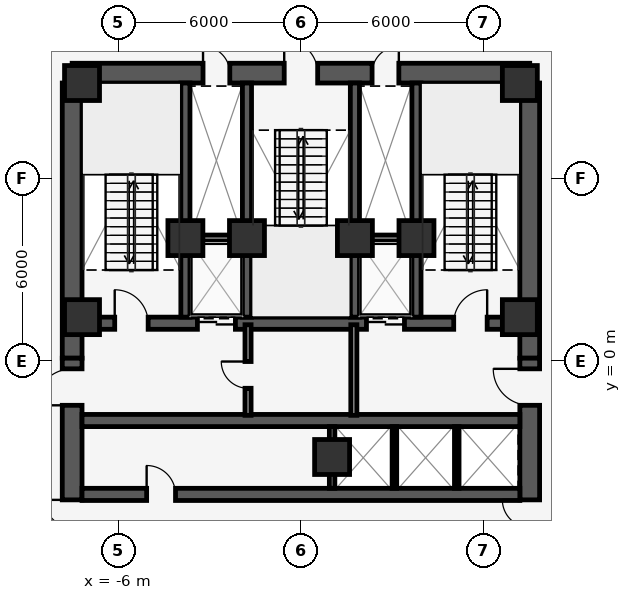
"""IFC4 building model, lengths in metres.
Left out: names, types, materials, properties, quantities, classifications, styles, units other than length and angle.
Written with IfcOpenShell. Run it as: python <this file> out.ifc"""

import sys

from ifc_helpers import new_model, si_unit, direction, frame, frame_2d, origin, origin_2d, place, context, subcontext, project, spatial, rectangle, extrude, element, fill, save


model = new_model("IFC4")
c1 = context("Model", 3, precision=1e-05, world=origin(), true_north=direction((0.0, 1.0)))
c2 = subcontext(c1, "Body", "Model", "MODEL_VIEW")
j1 = project(units=[si_unit("LENGTHUNIT", "METRE"), si_unit("PLANEANGLEUNIT", "RADIAN")], contexts=[c1])
p1 = place(None, origin())
s1 = spatial("IfcSite", under=j1, at=p1, CompositionType="ELEMENT")
p2 = place(p1, origin())
s2 = spatial("IfcBuilding", under=s1, at=p2, CompositionType="ELEMENT")
p3 = place(p2, frame((0.0, 0.0, 218.8)))
s3 = spatial("IfcBuildingStorey", under=s2, at=p3, CompositionType="ELEMENT", Elevation=218.8)
p4 = place(p3, frame((-7.525, 9.475, 0.0), z_axis=(0.0, 0.0, 1.0), x_axis=(1.0, 0.0, 0.0)))
e1 = element("IfcWall", 1, at=p4, inside=s3, PredefinedType="SHEAR", context=c2, shape_type="SweptSolid", body=[
    extrude(rectangle(XDim=15.05, YDim=0.65, at=frame_2d((7.525, 0.0))), origin(), (0.0, 0.0, 1.0), 3.85),
])
p5 = place(p4, frame((6.975, 0.0, 0.0)))
e2 = element("IfcOpeningElement", 2, at=p5, cuts=e1, PredefinedType="OPENING", context=c2, shape_type="SweptSolid", body=[
    extrude(rectangle(XDim=1.1, YDim=2.15, at=frame_2d((0.55, 1.075))), frame((0.0, 0.335, 0.0), z_axis=(0.0, -1.0, 0.0), x_axis=(1.0, 0.0, 0.0)), (0.0, 0.0, 1.0), 0.67),
])
p6 = place(p4, frame((4.305, 0.0, 0.0)))
e3 = element("IfcOpeningElement", 3, at=p6, cuts=e1, PredefinedType="OPENING", context=c2, shape_type="SweptSolid", body=[
    extrude(rectangle(XDim=0.88, YDim=2.15, at=frame_2d((0.44, 1.075))), frame((0.0, 0.335, 0.0), z_axis=(0.0, -1.0, 0.0), x_axis=(1.0, 0.0, 0.0)), (0.0, 0.0, 1.0), 0.67),
])
p7 = place(p4, frame((9.865, 0.0, 0.0)))
e4 = element("IfcOpeningElement", 4, at=p7, cuts=e1, PredefinedType="OPENING", context=c2, shape_type="SweptSolid", body=[
    extrude(rectangle(XDim=0.88, YDim=2.15, at=frame_2d((0.44, 1.075))), frame((0.0, 0.335, 0.0), z_axis=(0.0, -1.0, 0.0), x_axis=(1.0, 0.0, 0.0)), (0.0, 0.0, 1.0), 0.67),
])
p8 = place(p3, frame((-7.2, 1.25, 0.0), z_axis=(0.0, 0.0, 1.0), x_axis=(1.0, 0.0, 0.0)))
e5 = element("IfcWall", 5, at=p8, inside=s3, PredefinedType="SHEAR", context=c2, shape_type="SweptSolid", body=[
    extrude(rectangle(XDim=14.4, YDim=0.4, at=frame_2d((7.2, 0.0))), origin(), (0.0, 0.0, 1.0), 3.85),
])
p9 = place(p8, frame((3.795, 0.0, 0.0)))
e6 = element("IfcOpeningElement", 6, at=p9, cuts=e5, PredefinedType="OPENING", context=c2, shape_type="SweptSolid", body=[
    extrude(rectangle(XDim=1.25, YDim=2.25, at=frame_2d((0.625, 1.125))), frame((0.0, 0.21, 0.0), z_axis=(0.0, -1.0, 0.0), x_axis=(1.0, 0.0, 0.0)), (0.0, 0.0, 1.0), 0.42),
])
p10 = place(p8, frame((9.355, 0.0, 0.0)))
e7 = element("IfcOpeningElement", 7, at=p10, cuts=e5, PredefinedType="OPENING", context=c2, shape_type="SweptSolid", body=[
    extrude(rectangle(XDim=1.25, YDim=2.25, at=frame_2d((0.625, 1.125))), frame((0.0, 0.21, 0.0), z_axis=(0.0, -1.0, 0.0), x_axis=(1.0, 0.0, 0.0)), (0.0, 0.0, 1.0), 0.42),
])
p11 = place(p8, frame((1.075, 0.0, 0.0)))
e8 = element("IfcOpeningElement", 8, at=p11, cuts=e5, PredefinedType="OPENING", context=c2, shape_type="SweptSolid", body=[
    extrude(rectangle(XDim=1.1, YDim=2.15, at=frame_2d((0.55, 1.075))), frame((0.0, 0.21, 0.0), z_axis=(0.0, -1.0, 0.0), x_axis=(1.0, 0.0, 0.0)), (0.0, 0.0, 1.0), 0.42),
])
p12 = place(p8, frame((12.225, 0.0, 0.0)))
e9 = element("IfcOpeningElement", 9, at=p12, cuts=e5, PredefinedType="OPENING", context=c2, shape_type="SweptSolid", body=[
    extrude(rectangle(XDim=1.1, YDim=2.15, at=frame_2d((0.55, 1.075))), frame((0.0, 0.21, 0.0), z_axis=(0.0, -1.0, 0.0), x_axis=(1.0, 0.0, 0.0)), (0.0, 0.0, 1.0), 0.42),
])
for number, where, z_axis, x_axis in (
    (10, (-3.8, 1.45, 0.0), (0.0, 0.0, 1.0), (0.0, 1.0, 0.0)),
    (11, (-1.775, 1.45, 0.0), (0.0, 0.0, 1.0), (0.0, 1.0, 0.0)),
    (12, (1.775, 1.45, 0.0), (0.0, 0.0, 1.0), (0.0, 1.0, 0.0)),
    (13, (3.8, 1.45, 0.0), (0.0, 0.0, 1.0), (0.0, 1.0, 0.0)),
):
    element("IfcWall", number, at=place(p3, frame(where, z_axis=z_axis, x_axis=x_axis)), inside=s3, PredefinedType="SHEAR", context=c2, shape_type="SweptSolid", body=[
        extrude(rectangle(XDim=7.7, YDim=0.3, at=frame_2d((3.85, 0.0))), origin(), (0.0, 0.0, 1.0), 3.85),
    ])
for number, where, z_axis, x_axis in (
    (14, (-7.525, 0.1, 0.0), (0.0, 0.0, 1.0), (0.0, 1.0, 0.0)),
    (15, (7.525, 0.1, 0.0), (0.0, 0.0, 1.0), (0.0, 1.0, 0.0)),
):
    element("IfcWall", number, at=place(p3, frame(where, z_axis=z_axis, x_axis=x_axis)), inside=s3, PredefinedType="SHEAR", context=c2, shape_type="SweptSolid", body=[
        extrude(rectangle(XDim=9.05, YDim=0.65, at=frame_2d((4.525, 0.0))), origin(), (0.0, 0.0, 1.0), 3.85),
    ])
p13 = place(p3, frame((-7.525, -8.925, 0.0), z_axis=(0.0, 0.0, 1.0), x_axis=(0.0, 1.0, 0.0)))
e16 = element("IfcWall", 16, at=p13, inside=s3, PredefinedType="SHEAR", context=c2, shape_type="SweptSolid", body=[
    extrude(rectangle(XDim=9.025, YDim=0.65, at=frame_2d((4.513, 0.0))), origin(), (0.0, 0.0, 1.0), 3.85),
])
p14 = place(p13, frame((2.565, 0.0, 0.0)))
e17 = element("IfcOpeningElement", 17, at=p14, cuts=e16, PredefinedType="OPENING", context=c2, shape_type="SweptSolid", body=[
    extrude(rectangle(XDim=1.8, YDim=2.2, at=frame_2d((0.9, 1.1))), frame((0.0, 0.335, 0.0), z_axis=(0.0, -1.0, 0.0), x_axis=(1.0, 0.0, 0.0)), (0.0, 0.0, 1.0), 0.67),
])
p15 = place(p13, frame((7.475, 0.0, 0.0)))
e18 = element("IfcOpeningElement", 18, at=p15, cuts=e16, PredefinedType="OPENING", context=c2, shape_type="SweptSolid", body=[
    extrude(rectangle(XDim=1.2, YDim=2.15, at=frame_2d((0.6, 1.075))), frame((0.0, 0.335, 0.0), z_axis=(0.0, -1.0, 0.0), x_axis=(1.0, 0.0, 0.0)), (0.0, 0.0, 1.0), 0.67),
])
p16 = place(p3, frame((7.525, -8.925, 0.0), z_axis=(0.0, 0.0, 1.0), x_axis=(0.0, 1.0, 0.0)))
e19 = element("IfcWall", 19, at=p16, inside=s3, PredefinedType="SHEAR", context=c2, shape_type="SweptSolid", body=[
    extrude(rectangle(XDim=9.025, YDim=0.65, at=frame_2d((4.513, 0.0))), origin(), (0.0, 0.0, 1.0), 3.85),
])
p17 = place(p16, frame((2.565, 0.0, 0.0)))
e20 = element("IfcOpeningElement", 20, at=p17, cuts=e19, PredefinedType="OPENING", context=c2, shape_type="SweptSolid", body=[
    extrude(rectangle(XDim=1.8, YDim=2.2, at=frame_2d((0.9, 1.1))), frame((0.0, 0.335, 0.0), z_axis=(0.0, -1.0, 0.0), x_axis=(1.0, 0.0, 0.0)), (0.0, 0.0, 1.0), 0.67),
])
p18 = place(p16, frame((7.475, 0.0, 0.0)))
e21 = element("IfcOpeningElement", 21, at=p18, cuts=e19, PredefinedType="OPENING", context=c2, shape_type="SweptSolid", body=[
    extrude(rectangle(XDim=1.2, YDim=2.15, at=frame_2d((0.6, 1.075))), frame((0.0, 0.335, 0.0), z_axis=(0.0, -1.0, 0.0), x_axis=(1.0, 0.0, 0.0)), (0.0, 0.0, 1.0), 0.67),
])
p19 = place(p3, frame((-7.2, -1.95, 0.0), z_axis=(0.0, 0.0, 1.0), x_axis=(1.0, 0.0, 0.0)))
e22 = element("IfcWall", 22, at=p19, inside=s3, PredefinedType="SHEAR", context=c2, shape_type="SweptSolid", body=[
    extrude(rectangle(XDim=14.4, YDim=0.4, at=frame_2d((7.2, 0.0))), origin(), (0.0, 0.0, 1.0), 3.85),
])
p20 = place(p3, frame((-7.2, -4.38, 0.0), z_axis=(0.0, 0.0, 1.0), x_axis=(1.0, 0.0, 0.0)))
e23 = element("IfcWall", 23, at=p20, inside=s3, PredefinedType="SHEAR", context=c2, shape_type="SweptSolid", body=[
    extrude(rectangle(XDim=14.4, YDim=0.4, at=frame_2d((7.2, 0.0))), origin(), (0.0, 0.0, 1.0), 3.85),
])
p21 = place(p20, frame((2.125, 0.0, 0.0)))
e24 = element("IfcOpeningElement", 24, at=p21, cuts=e23, PredefinedType="OPENING", context=c2, shape_type="SweptSolid", body=[
    extrude(rectangle(XDim=0.95, YDim=2.15, at=frame_2d((0.475, 1.075))), frame((0.0, 0.21, 0.0), z_axis=(0.0, -1.0, 0.0), x_axis=(1.0, 0.0, 0.0)), (0.0, 0.0, 1.0), 0.42),
])
for number, where, z_axis, x_axis in (
    (25, (7.2, 1.45, 0.0), (0.0, 0.0, 1.0), (1.0, 0.0, 0.0)),
    (26, (7.2, 9.15, 0.0), (0.0, 0.0, 1.0), (1.0, 0.0, 0.0)),
    (27, (-7.2, 9.15, 0.0), (0.0, 0.0, 1.0), (1.0, 0.0, 0.0)),
    (28, (-7.2, 1.45, 0.0), (0.0, 0.0, 1.0), (1.0, 0.0, 0.0)),
    (29, (-3.8, 4.05, 0.0), (0.0, 0.0, 1.0), (1.0, 0.0, 0.0)),
    (30, (3.8, 4.05, 0.0), (0.0, 0.0, 1.0), (1.0, 0.0, 0.0)),
    (31, (-1.775, 4.05, 0.0), (0.0, 0.0, 1.0), (1.0, 0.0, 0.0)),
    (32, (1.775, 4.05, 0.0), (0.0, 0.0, 1.0), (1.0, 0.0, 0.0)),
    (33, (1.025, -3.15, 0.0), (0.0, 0.0, 1.0), (1.0, 0.0, 0.0)),
):
    element("IfcColumn", number, at=place(p3, frame(where, z_axis=z_axis, x_axis=x_axis)), inside=s3, PredefinedType="COLUMN", context=c2, shape_type="SweptSolid", body=[
        extrude(rectangle(XDim=1.15, YDim=1.15, at=origin_2d()), origin(), (0.0, 0.0, 1.0), 4.1),
    ])
p22 = place(p3, frame((-15.144, 28.322, 0.0), z_axis=(0.0, 0.0, 1.0), x_axis=(0.908932099953, -0.416944166136, 0.0)))
e34 = element("IfcWall", 34, at=p22, inside=s3, PredefinedType="STANDARD", context=c2, shape_type="SweptSolid", body=[
    extrude(rectangle(XDim=52.128, YDim=0.3, at=frame_2d((26.064, 0.0))), origin(), (0.0, 0.0, 1.0), 3.85),
])
p23 = place(p22, frame((5.864, 0.0, 0.85)))
e35 = element("IfcOpeningElement", 35, at=p23, cuts=e34, PredefinedType="OPENING", context=c2, shape_type="SweptSolid", body=[
    extrude(rectangle(XDim=1.2, YDim=2.2, at=frame_2d((0.6, 1.1))), frame((0.0, 0.16, 0.0), z_axis=(0.0, -1.0, 0.0), x_axis=(1.0, 0.0, 0.0)), (0.0, 0.0, 1.0), 0.32),
])
p24 = place(p22, frame((22.664, 0.0, 0.85)))
e36 = element("IfcOpeningElement", 36, at=p24, cuts=e34, PredefinedType="OPENING", context=c2, shape_type="SweptSolid", body=[
    extrude(rectangle(XDim=1.2, YDim=2.2, at=frame_2d((0.6, 1.1))), frame((0.0, 0.16, 0.0), z_axis=(0.0, -1.0, 0.0), x_axis=(1.0, 0.0, 0.0)), (0.0, 0.0, 1.0), 0.32),
])
p25 = place(p22, frame((28.264, 0.0, 0.85)))
e37 = element("IfcOpeningElement", 37, at=p25, cuts=e34, PredefinedType="OPENING", context=c2, shape_type="SweptSolid", body=[
    extrude(rectangle(XDim=1.2, YDim=2.2, at=frame_2d((0.6, 1.1))), frame((0.0, 0.16, 0.0), z_axis=(0.0, -1.0, 0.0), x_axis=(1.0, 0.0, 0.0)), (0.0, 0.0, 1.0), 0.32),
])
p26 = place(p22, frame((39.464, 0.0, 0.85)))
e38 = element("IfcOpeningElement", 38, at=p26, cuts=e34, PredefinedType="OPENING", context=c2, shape_type="SweptSolid", body=[
    extrude(rectangle(XDim=1.2, YDim=2.2, at=frame_2d((0.6, 1.1))), frame((0.0, 0.16, 0.0), z_axis=(0.0, -1.0, 0.0), x_axis=(1.0, 0.0, 0.0)), (0.0, 0.0, 1.0), 0.32),
])
p27 = place(p22, frame((45.064, 0.0, 0.85)))
e39 = element("IfcOpeningElement", 39, at=p27, cuts=e34, PredefinedType="OPENING", context=c2, shape_type="SweptSolid", body=[
    extrude(rectangle(XDim=1.2, YDim=2.2, at=frame_2d((0.6, 1.1))), frame((0.0, 0.16, 0.0), z_axis=(0.0, -1.0, 0.0), x_axis=(1.0, 0.0, 0.0)), (0.0, 0.0, 1.0), 0.32),
])
p28 = place(p3, frame((32.918, -0.931, 0.0), z_axis=(0.0, 0.0, 1.0), x_axis=(-0.819151415939, -0.573577333727, 0.0)))
e40 = element("IfcWall", 40, at=p28, inside=s3, PredefinedType="STANDARD", context=c2, shape_type="SweptSolid", body=[
    extrude(rectangle(XDim=52.863, YDim=0.3, at=frame_2d((26.431, 0.0))), origin(), (0.0, 0.0, 1.0), 3.85),
])
p29 = place(p28, frame((25.931, 0.0, 0.0)))
e41 = element("IfcOpeningElement", 41, at=p29, cuts=e40, PredefinedType="OPENING", context=c2, shape_type="SweptSolid", body=[
    extrude(rectangle(XDim=1.0, YDim=2.15, at=frame_2d((0.5, 1.075))), frame((0.0, 0.16, 0.0), z_axis=(0.0, -1.0, 0.0), x_axis=(1.0, 0.0, 0.0)), (0.0, 0.0, 1.0), 0.32),
])
p30 = place(p28, frame((6.231, 0.0, 0.85)))
e42 = element("IfcOpeningElement", 42, at=p30, cuts=e40, PredefinedType="OPENING", context=c2, shape_type="SweptSolid", body=[
    extrude(rectangle(XDim=1.2, YDim=2.2, at=frame_2d((0.6, 1.1))), frame((0.0, 0.16, 0.0), z_axis=(0.0, -1.0, 0.0), x_axis=(1.0, 0.0, 0.0)), (0.0, 0.0, 1.0), 0.32),
])
p31 = place(p28, frame((11.831, 0.0, 0.85)))
e43 = element("IfcOpeningElement", 43, at=p31, cuts=e40, PredefinedType="OPENING", context=c2, shape_type="SweptSolid", body=[
    extrude(rectangle(XDim=1.2, YDim=2.2, at=frame_2d((0.6, 1.1))), frame((0.0, 0.16, 0.0), z_axis=(0.0, -1.0, 0.0), x_axis=(1.0, 0.0, 0.0)), (0.0, 0.0, 1.0), 0.32),
])
p32 = place(p28, frame((23.031, 0.0, 0.85)))
e44 = element("IfcOpeningElement", 44, at=p32, cuts=e40, PredefinedType="OPENING", context=c2, shape_type="SweptSolid", body=[
    extrude(rectangle(XDim=1.2, YDim=2.2, at=frame_2d((0.6, 1.1))), frame((0.0, 0.16, 0.0), z_axis=(0.0, -1.0, 0.0), x_axis=(1.0, 0.0, 0.0)), (0.0, 0.0, 1.0), 0.32),
])
p33 = place(p28, frame((28.631, 0.0, 0.85)))
e45 = element("IfcOpeningElement", 45, at=p33, cuts=e40, PredefinedType="OPENING", context=c2, shape_type="SweptSolid", body=[
    extrude(rectangle(XDim=1.2, YDim=2.2, at=frame_2d((0.6, 1.1))), frame((0.0, 0.16, 0.0), z_axis=(0.0, -1.0, 0.0), x_axis=(1.0, 0.0, 0.0)), (0.0, 0.0, 1.0), 0.32),
])
p34 = place(p28, frame((39.831, 0.0, 0.85)))
e46 = element("IfcOpeningElement", 46, at=p34, cuts=e40, PredefinedType="OPENING", context=c2, shape_type="SweptSolid", body=[
    extrude(rectangle(XDim=1.2, YDim=2.2, at=frame_2d((0.6, 1.1))), frame((0.0, 0.16, 0.0), z_axis=(0.0, -1.0, 0.0), x_axis=(1.0, 0.0, 0.0)), (0.0, 0.0, 1.0), 0.32),
])
p35 = place(p28, frame((45.431, 0.0, 0.85)))
e47 = element("IfcOpeningElement", 47, at=p35, cuts=e40, PredefinedType="OPENING", context=c2, shape_type="SweptSolid", body=[
    extrude(rectangle(XDim=1.2, YDim=2.2, at=frame_2d((0.6, 1.1))), frame((0.0, 0.16, 0.0), z_axis=(0.0, -1.0, 0.0), x_axis=(1.0, 0.0, 0.0)), (0.0, 0.0, 1.0), 0.32),
])
for number, where, z_axis, x_axis in (
    (48, (-3.65, 4.05, 0.0), (0.0, 0.0, 1.0), (1.0, 0.0, 0.0)),
    (49, (1.92, 4.05, 0.0), (0.0, 0.0, 1.0), (1.0, 0.0, 0.0)),
):
    element("IfcWall", number, at=place(p3, frame(where, z_axis=z_axis, x_axis=x_axis)), inside=s3, PredefinedType="PARTITIONING", context=c2, shape_type="SweptSolid", body=[
        extrude(rectangle(XDim=1.73, YDim=0.2, at=frame_2d((0.865, 0.0))), origin(), (0.0, 0.0, 1.0), 3.85),
    ])
p36 = place(p3, frame((1.025, -4.18, 0.0), z_axis=(0.0, 0.0, 1.0), x_axis=(0.0, 1.0, 0.0)))
e50 = element("IfcWall", 50, at=p36, inside=s3, PredefinedType="PARTITIONING", context=c2, shape_type="SweptSolid", body=[
    extrude(rectangle(XDim=2.03, YDim=0.18, at=frame_2d((1.015, 0.0))), origin(), (0.0, 0.0, 1.0), 2.898),
])
for number, where, z_axis, x_axis in (
    (51, (3.075, -4.18, 0.0), (0.0, 0.0, 1.0), (0.0, 1.0, 0.0)),
    (52, (5.125, -4.18, 0.0), (0.0, 0.0, 1.0), (0.0, 1.0, 0.0)),
):
    element("IfcWall", number, at=place(p3, frame(where, z_axis=z_axis, x_axis=x_axis)), inside=s3, PredefinedType="PARTITIONING", context=c2, shape_type="SweptSolid", body=[
        extrude(rectangle(XDim=2.03, YDim=0.15, at=frame_2d((1.015, 0.0))), origin(), (0.0, 0.0, 1.0), 3.85),
    ])
p37 = place(p3, frame((-1.74, -1.78, 0.0), z_axis=(0.0, 0.0, 1.0), x_axis=(0.0, 1.0, 0.0)))
e53 = element("IfcWall", 53, at=p37, inside=s3, PredefinedType="PARTITIONING", context=c2, shape_type="SweptSolid", body=[
    extrude(rectangle(XDim=2.98, YDim=0.2, at=frame_2d((1.49, 0.0))), origin(), (0.0, 0.0, 1.0), 3.85),
])
p38 = place(p37, frame((0.89, 0.0, 0.0)))
e54 = element("IfcOpeningElement", 54, at=p38, cuts=e53, PredefinedType="OPENING", context=c2, shape_type="SweptSolid", body=[
    extrude(rectangle(XDim=0.88, YDim=2.15, at=frame_2d((0.44, 1.075))), frame((0.0, 0.11, 0.0), z_axis=(0.0, -1.0, 0.0), x_axis=(1.0, 0.0, 0.0)), (0.0, 0.0, 1.0), 0.22),
])
p39 = place(p3, frame((1.74, -1.78, 0.0), z_axis=(0.0, 0.0, 1.0), x_axis=(0.0, 1.0, 0.0)))
e55 = element("IfcWall", 55, at=p39, inside=s3, PredefinedType="PARTITIONING", context=c2, shape_type="SweptSolid", body=[
    extrude(rectangle(XDim=2.98, YDim=0.2, at=frame_2d((1.49, 0.0))), origin(), (0.0, 0.0, 1.0), 3.85),
])
p40 = place(p9, origin())
e56 = element("IfcDoor", 56, at=p40, inside=s3, OperationType="DOUBLE_DOOR_SLIDING", PredefinedType="DOOR", context=c2, shape_type="SweptSolid", body=[
    extrude(rectangle(XDim=1.25, YDim=2.25, at=frame_2d((0.625, 1.125))), frame((0.0, 0.025, 0.0), z_axis=(0.0, -1.0, 0.0), x_axis=(1.0, 0.0, 0.0)), (0.0, 0.0, 1.0), 0.05),
])
fill(e6, e56)
p41 = place(p10, origin())
e57 = element("IfcDoor", 57, at=p41, inside=s3, OperationType="DOUBLE_DOOR_SLIDING", PredefinedType="DOOR", context=c2, shape_type="SweptSolid", body=[
    extrude(rectangle(XDim=1.25, YDim=2.25, at=frame_2d((0.625, 1.125))), frame((0.0, 0.025, 0.0), z_axis=(0.0, -1.0, 0.0), x_axis=(1.0, 0.0, 0.0)), (0.0, 0.0, 1.0), 0.05),
])
fill(e7, e57)
p42 = place(p11, origin())
e58 = element("IfcDoor", 58, at=p42, inside=s3, OperationType="SINGLE_SWING_LEFT", PredefinedType="DOOR", context=c2, shape_type="SweptSolid", body=[
    extrude(rectangle(XDim=1.1, YDim=2.15, at=frame_2d((0.55, 1.075))), frame((0.0, 0.025, 0.0), z_axis=(0.0, -1.0, 0.0), x_axis=(1.0, 0.0, 0.0)), (0.0, 0.0, 1.0), 0.05),
])
fill(e8, e58)
p43 = place(p12, origin())
e59 = element("IfcDoor", 59, at=p43, inside=s3, OperationType="SINGLE_SWING_RIGHT", PredefinedType="DOOR", context=c2, shape_type="SweptSolid", body=[
    extrude(rectangle(XDim=1.1, YDim=2.15, at=frame_2d((0.55, 1.075))), frame((0.0, 0.025, 0.0), z_axis=(0.0, -1.0, 0.0), x_axis=(1.0, 0.0, 0.0)), (0.0, 0.0, 1.0), 0.05),
])
fill(e9, e59)
p44 = place(p5, origin())
e60 = element("IfcDoor", 60, at=p44, inside=s3, OperationType="SINGLE_SWING_LEFT", PredefinedType="DOOR", context=c2, shape_type="SweptSolid", body=[
    extrude(rectangle(XDim=1.1, YDim=2.15, at=frame_2d((0.55, 1.075))), frame((0.0, 0.025, 0.0), z_axis=(0.0, -1.0, 0.0), x_axis=(1.0, 0.0, 0.0)), (0.0, 0.0, 1.0), 0.05),
])
fill(e2, e60)
p45 = place(p6, origin())
e61 = element("IfcDoor", 61, at=p45, inside=s3, OperationType="SINGLE_SWING_LEFT", PredefinedType="DOOR", context=c2, shape_type="SweptSolid", body=[
    extrude(rectangle(XDim=0.88, YDim=2.15, at=frame_2d((0.44, 1.075))), frame((0.0, 0.025, 0.0), z_axis=(0.0, -1.0, 0.0), x_axis=(1.0, 0.0, 0.0)), (0.0, 0.0, 1.0), 0.05),
])
fill(e3, e61)
p46 = place(p7, origin())
e62 = element("IfcDoor", 62, at=p46, inside=s3, OperationType="SINGLE_SWING_RIGHT", PredefinedType="DOOR", context=c2, shape_type="SweptSolid", body=[
    extrude(rectangle(XDim=0.88, YDim=2.15, at=frame_2d((0.44, 1.075))), frame((0.0, 0.025, 0.0), z_axis=(0.0, -1.0, 0.0), x_axis=(1.0, 0.0, 0.0)), (0.0, 0.0, 1.0), 0.05),
])
fill(e4, e62)
p47 = place(p14, origin())
e63 = element("IfcDoor", 63, at=p47, inside=s3, OperationType="DOUBLE_DOOR_SINGLE_SWING", PredefinedType="DOOR", context=c2, shape_type="SweptSolid", body=[
    extrude(rectangle(XDim=1.8, YDim=2.2, at=frame_2d((0.9, 1.1))), frame((0.0, 0.025, 0.0), z_axis=(0.0, -1.0, 0.0), x_axis=(1.0, 0.0, 0.0)), (0.0, 0.0, 1.0), 0.05),
])
fill(e17, e63)
p48 = place(p15, origin())
e64 = element("IfcDoor", 64, at=p48, inside=s3, OperationType="SINGLE_SWING_LEFT", PredefinedType="DOOR", context=c2, shape_type="SweptSolid", body=[
    extrude(rectangle(XDim=1.2, YDim=2.15, at=frame_2d((0.6, 1.075))), frame((0.0, 0.025, 0.0), z_axis=(0.0, -1.0, 0.0), x_axis=(1.0, 0.0, 0.0)), (0.0, 0.0, 1.0), 0.05),
])
fill(e18, e64)
p49 = place(p17, origin())
e65 = element("IfcDoor", 65, at=p49, inside=s3, OperationType="DOUBLE_DOOR_SINGLE_SWING", PredefinedType="DOOR", context=c2, shape_type="SweptSolid", body=[
    extrude(rectangle(XDim=1.8, YDim=2.2, at=frame_2d((0.9, 1.1))), frame((0.0, 0.025, 0.0), z_axis=(0.0, -1.0, 0.0), x_axis=(1.0, 0.0, 0.0)), (0.0, 0.0, 1.0), 0.05),
])
fill(e20, e65)
p50 = place(p18, origin())
e66 = element("IfcDoor", 66, at=p50, inside=s3, OperationType="SINGLE_SWING_RIGHT", PredefinedType="DOOR", context=c2, shape_type="SweptSolid", body=[
    extrude(rectangle(XDim=1.2, YDim=2.15, at=frame_2d((0.6, 1.075))), frame((0.0, 0.025, 0.0), z_axis=(0.0, -1.0, 0.0), x_axis=(1.0, 0.0, 0.0)), (0.0, 0.0, 1.0), 0.05),
])
fill(e21, e66)
p51 = place(p21, origin())
e67 = element("IfcDoor", 67, at=p51, inside=s3, OperationType="SINGLE_SWING_LEFT", PredefinedType="DOOR", context=c2, shape_type="SweptSolid", body=[
    extrude(rectangle(XDim=0.95, YDim=2.15, at=frame_2d((0.475, 1.075))), frame((0.0, 0.025, 0.0), z_axis=(0.0, -1.0, 0.0), x_axis=(1.0, 0.0, 0.0)), (0.0, 0.0, 1.0), 0.05),
])
fill(e24, e67)
p52 = place(p38, origin())
e68 = element("IfcDoor", 68, at=p52, inside=s3, OperationType="SINGLE_SWING_RIGHT", PredefinedType="DOOR", context=c2, shape_type="SweptSolid", body=[
    extrude(rectangle(XDim=0.88, YDim=2.15, at=frame_2d((0.44, 1.075))), frame((0.0, 0.025, 0.0), z_axis=(0.0, -1.0, 0.0), x_axis=(1.0, 0.0, 0.0)), (0.0, 0.0, 1.0), 0.05),
])
fill(e54, e68)
save(model, sys.argv[1])
